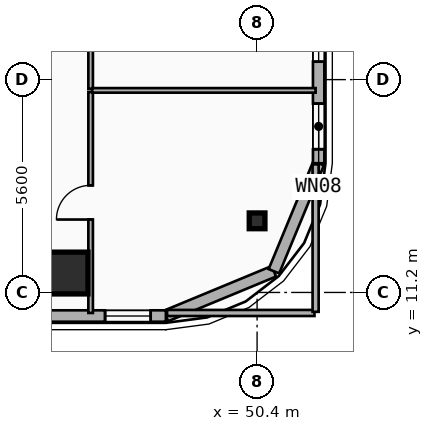
"""IFC4 building model, lengths in metres.
Left out: names, types, materials, properties, quantities, classifications, styles, units other than length and angle.
Written with IfcOpenShell. Run it as: python <this file> out.ifc"""

import sys

from ifc_helpers import new_model, si_unit, direction, frame, frame_2d, origin, origin_2d, place, context, subcontext, project, spatial, rectangle, i_section, extrude, element, fill, save


model = new_model("IFC4")
c1 = context("Model", 3, precision=1e-05, world=origin(), true_north=direction((0.0, 1.0)))
c2 = subcontext(c1, "Body", "Model", "MODEL_VIEW")
j1 = project(units=[si_unit("LENGTHUNIT", "METRE"), si_unit("PLANEANGLEUNIT", "RADIAN")], contexts=[c1])
p1 = place(None, origin())
s1 = spatial("IfcSite", under=j1, at=p1, CompositionType="ELEMENT")
p2 = place(p1, origin())
s2 = spatial("IfcBuilding", under=s1, at=p2, CompositionType="ELEMENT")
p3 = place(p2, frame((0.0, 0.0, 159.0)))
s3 = spatial("IfcBuildingStorey", under=s2, at=p3, CompositionType="ELEMENT", Elevation=159.0)
p4 = place(p3, frame((45.4, 11.819, 0.0), z_axis=(0.0, -0.090202269788, 0.995923466199), x_axis=(1.0, 0.0, 0.0)))
e1 = element("IfcColumn", 1, at=p4, inside=s3, PredefinedType="COLUMN", context=c2, shape_type="SweptSolid", body=[
    extrude(rectangle(XDim=1.1, YDim=1.1, at=origin_2d()), origin(), (0.0, 0.0, 1.0), 3.565),
])
p5 = place(p3, frame((50.4, 13.181, 0.0), z_axis=(0.0, -0.079930493943, 0.996800439475), x_axis=(1.0, 0.0, 0.0)))
e2 = element("IfcColumn", 2, at=p5, inside=s3, PredefinedType="COLUMN", context=c2, shape_type="SweptSolid", body=[
    extrude(i_section(OverallWidth=0.413, OverallDepth=0.415, WebThickness=0.03, FlangeThickness=0.047, FilletRadius=0.015, at=origin_2d()), origin(), (0.0, 0.0, 1.0), 3.562),
])
p6 = place(p3, frame((50.843, 11.757, 0.0), z_axis=(0.0, 0.0, 1.0), x_axis=(-0.92389884758, -0.382636798336, 0.0)))
e3 = element("IfcWall", 3, at=p6, inside=s3, PredefinedType="SOLIDWALL", context=c2, shape_type="SweptSolid", body=[
    extrude(rectangle(XDim=3.077, YDim=0.3, at=frame_2d((1.538, 0.0))), origin(), (0.0, 0.0, 1.0), 3.29),
])
p7 = place(p3, frame((52.02, 14.6, 0.0), z_axis=(0.0, 0.0, 1.0), x_axis=(-0.382676475685, -0.923882414032, 0.0)))
e4 = element("IfcWall", 4, at=p7, inside=s3, PredefinedType="SOLIDWALL", context=c2, shape_type="SweptSolid", body=[
    extrude(rectangle(XDim=3.077, YDim=0.3, at=frame_2d((1.539, 0.0))), origin(), (0.0, 0.0, 1.0), 3.29),
])
p8 = place(p3, frame((52.02, 37.6, 0.0), z_axis=(0.0, 0.0, 1.0), x_axis=(0.0, -1.0, 0.0)))
e5 = element("IfcWall", 5, at=p8, inside=s3, PredefinedType="SOLIDWALL", context=c2, shape_type="SweptSolid", body=[
    extrude(rectangle(XDim=23.0, YDim=0.3, at=frame_2d((11.5, 0.0))), origin(), (0.0, 0.0, 1.0), 3.29),
])
p9 = place(p8, frame((2.513, 0.0, 0.34)))
e6 = element("IfcOpeningElement", 6, at=p9, cuts=e5, PredefinedType="OPENING", context=c2, shape_type="SweptSolid", body=[
    extrude(rectangle(XDim=1.4, YDim=2.1, at=frame_2d((0.7, 1.05))), frame((0.0, 0.16, 0.0), z_axis=(0.0, -1.0, 0.0), x_axis=(1.0, 0.0, 0.0)), (0.0, 0.0, 1.0), 0.32),
])
p10 = place(p8, frame((6.107, 0.0, 0.34)))
e7 = element("IfcOpeningElement", 7, at=p10, cuts=e5, PredefinedType="OPENING", context=c2, shape_type="SweptSolid", body=[
    extrude(rectangle(XDim=1.4, YDim=2.1, at=frame_2d((0.7, 1.05))), frame((0.0, 0.16, 0.0), z_axis=(0.0, -1.0, 0.0), x_axis=(1.0, 0.0, 0.0)), (0.0, 0.0, 1.0), 0.32),
])
p11 = place(p8, frame((21.431, 0.0, 0.68)))
e8 = element("IfcOpeningElement", 8, at=p11, cuts=e5, PredefinedType="OPENING", context=c2, shape_type="SweptSolid", body=[
    extrude(rectangle(XDim=1.2, YDim=1.5, at=frame_2d((0.6, 0.75))), frame((0.0, 0.16, 0.0), z_axis=(0.0, -1.0, 0.0), x_axis=(1.0, 0.0, 0.0)), (0.0, 0.0, 1.0), 0.32),
])
p12 = place(p8, frame((17.073, 0.0, 0.34)))
e9 = element("IfcOpeningElement", 9, at=p12, cuts=e5, PredefinedType="OPENING", context=c2, shape_type="SweptSolid", body=[
    extrude(rectangle(XDim=1.4, YDim=2.1, at=frame_2d((0.7, 1.05))), frame((0.0, 0.16, 0.0), z_axis=(0.0, -1.0, 0.0), x_axis=(1.0, 0.0, 0.0)), (0.0, 0.0, 1.0), 0.32),
])
p13 = place(p8, frame((18.928, 0.0, 0.34)))
e10 = element("IfcOpeningElement", 10, at=p13, cuts=e5, PredefinedType="OPENING", context=c2, shape_type="SweptSolid", body=[
    extrude(rectangle(XDim=1.4, YDim=2.1, at=frame_2d((0.7, 1.05))), frame((0.0, 0.16, 0.0), z_axis=(0.0, -1.0, 0.0), x_axis=(1.0, 0.0, 0.0)), (0.0, 0.0, 1.0), 0.32),
])
p14 = place(p8, frame((13.484, 0.0, 0.34)))
e11 = element("IfcOpeningElement", 11, at=p14, cuts=e5, PredefinedType="OPENING", context=c2, shape_type="SweptSolid", body=[
    extrude(rectangle(XDim=1.4, YDim=2.1, at=frame_2d((0.7, 1.05))), frame((0.0, 0.16, 0.0), z_axis=(0.0, -1.0, 0.0), x_axis=(1.0, 0.0, 0.0)), (0.0, 0.0, 1.0), 0.32),
])
p15 = place(p3, frame((48.0, 10.58, 0.0), z_axis=(0.0, 0.0, 1.0), x_axis=(-1.0, 0.0, 0.0)))
e12 = element("IfcWall", 12, at=p15, inside=s3, PredefinedType="SOLIDWALL", context=c2, shape_type="SweptSolid", body=[
    extrude(rectangle(XDim=38.4, YDim=0.3, at=frame_2d((19.2, 0.0))), origin(), (0.0, 0.0, 1.0), 3.29),
])
p16 = place(p15, frame((36.407, 0.0, 0.75)))
e13 = element("IfcOpeningElement", 13, at=p16, cuts=e12, PredefinedType="OPENING", context=c2, shape_type="SweptSolid", body=[
    extrude(rectangle(XDim=1.6, YDim=1.95, at=frame_2d((0.8, 0.975))), frame((0.0, 0.16, 0.0), z_axis=(0.0, -1.0, 0.0), x_axis=(1.0, 0.0, 0.0)), (0.0, 0.0, 1.0), 0.32),
])
p17 = place(p15, frame((33.866, 0.0, 0.34)))
e14 = element("IfcOpeningElement", 14, at=p17, cuts=e12, PredefinedType="OPENING", context=c2, shape_type="SweptSolid", body=[
    extrude(rectangle(XDim=1.4, YDim=1.8, at=frame_2d((0.7, 0.9))), frame((0.0, 0.16, 0.0), z_axis=(0.0, -1.0, 0.0), x_axis=(1.0, 0.0, 0.0)), (0.0, 0.0, 1.0), 0.32),
])
p18 = place(p15, frame((27.319, 0.0, 1.05)))
e15 = element("IfcOpeningElement", 15, at=p18, cuts=e12, PredefinedType="OPENING", context=c2, shape_type="SweptSolid", body=[
    extrude(rectangle(XDim=1.2, YDim=1.5, at=frame_2d((0.6, 0.75))), frame((0.0, 0.16, 0.0), z_axis=(0.0, -1.0, 0.0), x_axis=(1.0, 0.0, 0.0)), (0.0, 0.0, 1.0), 0.32),
])
p19 = place(p15, frame((15.608, 0.0, 0.65)))
e16 = element("IfcOpeningElement", 16, at=p19, cuts=e12, PredefinedType="OPENING", context=c2, shape_type="SweptSolid", body=[
    extrude(rectangle(XDim=2.1, YDim=2.1, at=frame_2d((1.05, 1.05))), frame((0.0, 0.16, 0.0), z_axis=(0.0, -1.0, 0.0), x_axis=(1.0, 0.0, 0.0)), (0.0, 0.0, 1.0), 0.32),
])
p20 = place(p15, frame((22.175, 0.0, 0.65)))
e17 = element("IfcOpeningElement", 17, at=p20, cuts=e12, PredefinedType="OPENING", context=c2, shape_type="SweptSolid", body=[
    extrude(rectangle(XDim=2.1, YDim=2.1, at=frame_2d((1.05, 1.05))), frame((0.0, 0.16, 0.0), z_axis=(0.0, -1.0, 0.0), x_axis=(1.0, 0.0, 0.0)), (0.0, 0.0, 1.0), 0.32),
])
p21 = place(p15, frame((12.217, 0.0, 0.34)))
e18 = element("IfcOpeningElement", 18, at=p21, cuts=e12, PredefinedType="OPENING", context=c2, shape_type="SweptSolid", body=[
    extrude(rectangle(XDim=1.8, YDim=1.8, at=frame_2d((0.9, 0.9))), frame((0.0, 0.16, 0.0), z_axis=(0.0, -1.0, 0.0), x_axis=(1.0, 0.0, 0.0)), (0.0, 0.0, 1.0), 0.32),
])
p22 = place(p15, frame((3.319, 0.0, 1.05)))
e19 = element("IfcOpeningElement", 19, at=p22, cuts=e12, PredefinedType="OPENING", context=c2, shape_type="SweptSolid", body=[
    extrude(rectangle(XDim=1.2, YDim=1.5, at=frame_2d((0.6, 0.75))), frame((0.0, 0.16, 0.0), z_axis=(0.0, -1.0, 0.0), x_axis=(1.0, 0.0, 0.0)), (0.0, 0.0, 1.0), 0.32),
])
p23 = place(p15, frame((8.25, 0.0, 0.52)))
e20 = element("IfcOpeningElement", 20, at=p23, cuts=e12, PredefinedType="OPENING", context=c2, shape_type="SweptSolid", body=[
    extrude(rectangle(XDim=1.1, YDim=1.05, at=frame_2d((0.55, 0.525))), frame((0.0, 0.16, 0.0), z_axis=(0.0, -1.0, 0.0), x_axis=(1.0, 0.0, 0.0)), (0.0, 0.0, 1.0), 0.32),
])
p24 = place(p15, frame((0.4, 0.0, 0.68)))
e21 = element("IfcOpeningElement", 21, at=p24, cuts=e12, PredefinedType="OPENING", context=c2, shape_type="SweptSolid", body=[
    extrude(rectangle(XDim=1.2, YDim=1.5, at=frame_2d((0.6, 0.75))), frame((0.0, 0.16, 0.0), z_axis=(0.0, -1.0, 0.0), x_axis=(1.0, 0.0, 0.0)), (0.0, 0.0, 1.0), 0.32),
])
p25 = place(p3, frame((46.02, 10.66, 0.0), z_axis=(0.0, 0.0, 1.0), x_axis=(0.0, 1.0, 0.0)))
e22 = element("IfcWall", 22, at=p25, inside=s3, PredefinedType="PARTITIONING", context=c2, shape_type="SweptSolid", body=[
    extrude(rectangle(XDim=5.817, YDim=0.12, at=frame_2d((2.909, 0.0))), origin(), (0.0, 0.0, 1.0), 2.97),
])
p26 = place(p25, frame((2.458, 0.0, 0.0)))
e23 = element("IfcOpeningElement", 23, at=p26, cuts=e22, PredefinedType="OPENING", context=c2, shape_type="SweptSolid", body=[
    extrude(rectangle(XDim=0.9, YDim=2.1, at=frame_2d((0.45, 1.05))), frame((0.0, 0.07, 0.0), z_axis=(0.0, -1.0, 0.0), x_axis=(1.0, 0.0, 0.0)), (0.0, 0.0, 1.0), 0.14),
])
p27 = place(p3, frame((46.02, 16.557, 0.0), z_axis=(0.0, 0.0, 1.0), x_axis=(0.0, 1.0, 0.0)))
e24 = element("IfcWall", 24, at=p27, inside=s3, PredefinedType="PARTITIONING", context=c2, shape_type="SweptSolid", body=[
    extrude(rectangle(XDim=4.685, YDim=0.12, at=frame_2d((2.343, 0.0))), origin(), (0.0, 0.0, 1.0), 2.97),
])
p28 = place(p27, frame((1.893, 0.0, 0.0)))
e25 = element("IfcOpeningElement", 25, at=p28, cuts=e24, PredefinedType="OPENING", context=c2, shape_type="SweptSolid", body=[
    extrude(rectangle(XDim=0.9, YDim=2.1, at=frame_2d((0.45, 1.05))), frame((0.0, 0.07, 0.0), z_axis=(0.0, -1.0, 0.0), x_axis=(1.0, 0.0, 0.0)), (0.0, 0.0, 1.0), 0.14),
])
p29 = place(p3, frame((46.06, 16.517, 0.0), z_axis=(0.0, 0.0, 1.0), x_axis=(1.0, 0.0, 0.0)))
e26 = element("IfcWall", 26, at=p29, inside=s3, PredefinedType="PARTITIONING", context=c2, shape_type="SweptSolid", body=[
    extrude(rectangle(XDim=5.88, YDim=0.12, at=frame_2d((2.94, 0.0))), origin(), (0.0, 0.0, 1.0), 2.62),
])
p30 = place(p3, frame((48.03, 10.66, 0.0), z_axis=(0.0, 0.0, 1.0), x_axis=(1.0, 0.0, 0.0)))
e27 = element("IfcWall", 27, at=p30, inside=s3, PredefinedType="PARTITIONING", context=c2, shape_type="SweptSolid", body=[
    extrude(rectangle(XDim=3.88, YDim=0.16, at=frame_2d((1.94, 0.0))), origin(), (0.0, 0.0, 1.0), 3.29),
])
p31 = place(p3, frame((51.94, 10.69, 0.0), z_axis=(0.0, 0.0, 1.0), x_axis=(0.0, 1.0, 0.0)))
e28 = element("IfcWall", 28, at=p31, inside=s3, PredefinedType="PARTITIONING", context=c2, shape_type="SweptSolid", body=[
    extrude(rectangle(XDim=3.88, YDim=0.16, at=frame_2d((1.94, 0.0))), origin(), (0.0, 0.0, 1.0), 3.29),
])
p32 = place(p11, origin())
e29 = element("IfcWindow", 29, at=p32, inside=s3, PartitioningType="SINGLE_PANEL", PredefinedType="WINDOW", context=c2, shape_type="SweptSolid", body=[
    extrude(rectangle(XDim=1.2, YDim=1.5, at=frame_2d((0.6, 0.75))), frame((0.0, 0.03, 0.0), z_axis=(0.0, -1.0, 0.0), x_axis=(1.0, 0.0, 0.0)), (0.0, 0.0, 1.0), 0.06),
])
fill(e8, e29)
p33 = place(p13, origin())
e30 = element("IfcWindow", 30, at=p33, inside=s3, PartitioningType="SINGLE_PANEL", PredefinedType="WINDOW", context=c2, shape_type="SweptSolid", body=[
    extrude(rectangle(XDim=1.4, YDim=2.1, at=frame_2d((0.7, 1.05))), frame((0.0, 0.03, 0.0), z_axis=(0.0, -1.0, 0.0), x_axis=(1.0, 0.0, 0.0)), (0.0, 0.0, 1.0), 0.06),
])
fill(e10, e30)
p34 = place(p24, origin())
e31 = element("IfcWindow", 31, at=p34, inside=s3, PartitioningType="SINGLE_PANEL", PredefinedType="WINDOW", context=c2, shape_type="SweptSolid", body=[
    extrude(rectangle(XDim=1.2, YDim=1.5, at=frame_2d((0.6, 0.75))), frame((0.0, 0.03, 0.0), z_axis=(0.0, -1.0, 0.0), x_axis=(1.0, 0.0, 0.0)), (0.0, 0.0, 1.0), 0.06),
])
fill(e21, e31)
p35 = place(p26, origin())
e32 = element("IfcDoor", 32, at=p35, inside=s3, OperationType="SINGLE_SWING_LEFT", PredefinedType="DOOR", context=c2, shape_type="SweptSolid", body=[
    extrude(rectangle(XDim=0.9, YDim=2.1, at=frame_2d((0.45, 1.05))), frame((0.0, 0.025, 0.0), z_axis=(0.0, -1.0, 0.0), x_axis=(1.0, 0.0, 0.0)), (0.0, 0.0, 1.0), 0.05),
])
fill(e23, e32)
save(model, sys.argv[1])
